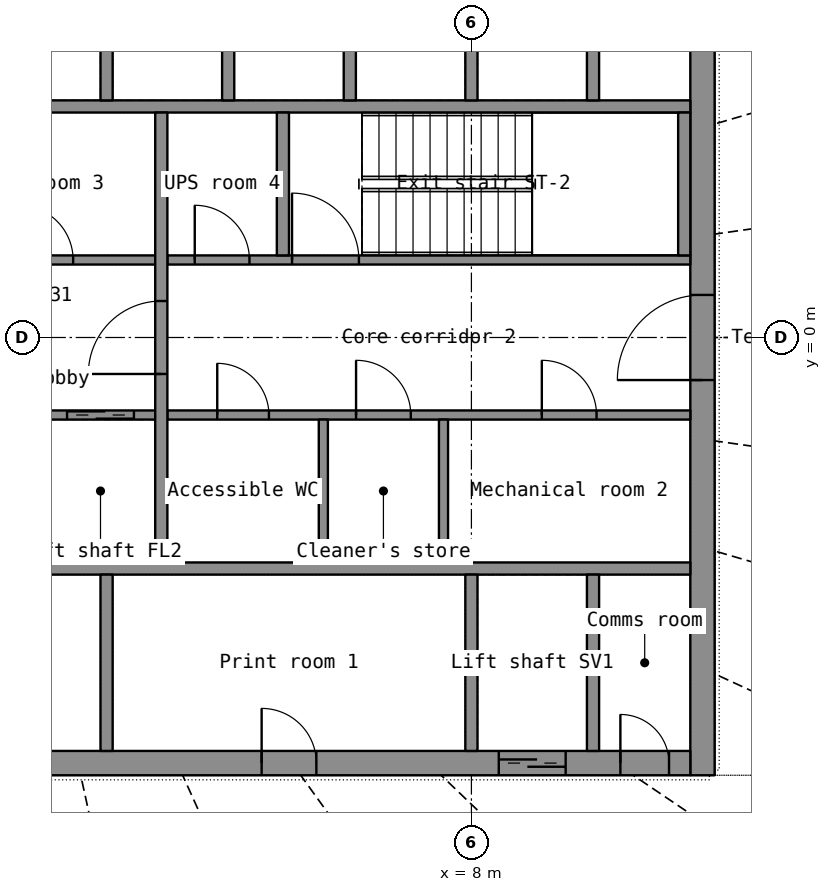
"""IFC4 building model, lengths in metres.
Left out: names, types, materials, properties, quantities, classifications, styles, units other than length and angle.
Written with IfcOpenShell. Run it as: python <this file> out.ifc"""

import sys

from ifc_helpers import new_model, si_unit, direction, frame, frame_2d, origin, place, context, subcontext, project, spatial, rectangle, extrude, element, fill, save


model = new_model("IFC4")
c1 = context("Model", 3, precision=1e-05, world=origin(), true_north=direction((0.0, 1.0)))
c2 = subcontext(c1, "Body", "Model", "MODEL_VIEW")
j1 = project(units=[si_unit("LENGTHUNIT", "METRE"), si_unit("PLANEANGLEUNIT", "RADIAN")], contexts=[c1])
p1 = place(None, origin())
s1 = spatial("IfcSite", under=j1, at=p1, CompositionType="ELEMENT")
p2 = place(p1, origin())
s2 = spatial("IfcBuilding", under=s1, at=p2, CompositionType="ELEMENT")
p3 = place(p2, frame((0.0, 0.0, 239.3)))
s3 = spatial("IfcBuildingStorey", under=s2, at=p3, CompositionType="ELEMENT", Elevation=239.3)
p4 = place(p3, frame((11.8, -7.2, 0.0), z_axis=(0.0, 0.0, 1.0), x_axis=(0.0, 1.0, 0.0)))
e1 = element("IfcWall", 1, at=p4, inside=s3, PredefinedType="SHEAR", context=c2, shape_type="SweptSolid", body=[
    extrude(rectangle(XDim=14.4, YDim=0.4, at=frame_2d((7.2, 0.0))), origin(), (0.0, 0.0, 1.0), 3.3),
])
p5 = place(p4, frame((6.5, 0.0, 0.0)))
e2 = element("IfcOpeningElement", 2, at=p5, cuts=e1, PredefinedType="OPENING", context=c2, shape_type="SweptSolid", body=[
    extrude(rectangle(XDim=1.4, YDim=2.2, at=frame_2d((0.7, 1.1))), frame((0.0, 0.21, 0.0), z_axis=(0.0, -1.0, 0.0), x_axis=(1.0, 0.0, 0.0)), (0.0, 0.0, 1.0), 0.42),
])
p6 = place(p3, frame((-11.6, -7.0, 0.0), z_axis=(0.0, 0.0, 1.0), x_axis=(1.0, 0.0, 0.0)))
e3 = element("IfcWall", 3, at=p6, inside=s3, PredefinedType="SHEAR", context=c2, shape_type="SweptSolid", body=[
    extrude(rectangle(XDim=23.2, YDim=0.4, at=frame_2d((11.6, 0.0))), origin(), (0.0, 0.0, 1.0), 3.3),
])
p7 = place(p6, frame((20.05, 0.0, 0.0)))
e4 = element("IfcOpeningElement", 4, at=p7, cuts=e3, PredefinedType="OPENING", context=c2, shape_type="SweptSolid", body=[
    extrude(rectangle(XDim=1.1, YDim=2.2, at=frame_2d((0.55, 1.1))), frame((0.0, 0.21, 0.0), z_axis=(0.0, -1.0, 0.0), x_axis=(1.0, 0.0, 0.0)), (0.0, 0.0, 1.0), 0.42),
])
p8 = place(p6, frame((5.15, 0.0, 0.0)))
e5 = element("IfcOpeningElement", 5, at=p8, cuts=e3, PredefinedType="OPENING", context=c2, shape_type="SweptSolid", body=[
    extrude(rectangle(XDim=0.9, YDim=2.1, at=frame_2d((0.45, 1.05))), frame((0.0, 0.21, 0.0), z_axis=(0.0, -1.0, 0.0), x_axis=(1.0, 0.0, 0.0)), (0.0, 0.0, 1.0), 0.42),
])
p9 = place(p6, frame((11.15, 0.0, 0.0)))
e6 = element("IfcOpeningElement", 6, at=p9, cuts=e3, PredefinedType="OPENING", context=c2, shape_type="SweptSolid", body=[
    extrude(rectangle(XDim=0.9, YDim=2.1, at=frame_2d((0.45, 1.05))), frame((0.0, 0.21, 0.0), z_axis=(0.0, -1.0, 0.0), x_axis=(1.0, 0.0, 0.0)), (0.0, 0.0, 1.0), 0.42),
])
p10 = place(p6, frame((16.15, 0.0, 0.0)))
e7 = element("IfcOpeningElement", 7, at=p10, cuts=e3, PredefinedType="OPENING", context=c2, shape_type="SweptSolid", body=[
    extrude(rectangle(XDim=0.9, YDim=2.1, at=frame_2d((0.45, 1.05))), frame((0.0, 0.21, 0.0), z_axis=(0.0, -1.0, 0.0), x_axis=(1.0, 0.0, 0.0)), (0.0, 0.0, 1.0), 0.42),
])
p11 = place(p6, frame((0.35, 0.0, 0.0)))
e8 = element("IfcOpeningElement", 8, at=p11, cuts=e3, PredefinedType="OPENING", context=c2, shape_type="SweptSolid", body=[
    extrude(rectangle(XDim=0.8, YDim=2.05, at=frame_2d((0.4, 1.025))), frame((0.0, 0.21, 0.0), z_axis=(0.0, -1.0, 0.0), x_axis=(1.0, 0.0, 0.0)), (0.0, 0.0, 1.0), 0.42),
])
p12 = place(p6, frame((22.05, 0.0, 0.0)))
e9 = element("IfcOpeningElement", 9, at=p12, cuts=e3, PredefinedType="OPENING", context=c2, shape_type="SweptSolid", body=[
    extrude(rectangle(XDim=0.8, YDim=2.05, at=frame_2d((0.4, 1.025))), frame((0.0, 0.21, 0.0), z_axis=(0.0, -1.0, 0.0), x_axis=(1.0, 0.0, 0.0)), (0.0, 0.0, 1.0), 0.42),
])
for number, where, z_axis, x_axis in (
    (10, (-11.6, -3.8, 0.0), (0.0, 0.0, 1.0), (1.0, 0.0, 0.0)),
    (11, (-11.6, 3.8, 0.0), (0.0, 0.0, 1.0), (1.0, 0.0, 0.0)),
):
    element("IfcWall", number, at=place(p3, frame(where, z_axis=z_axis, x_axis=x_axis)), inside=s3, PredefinedType="SHEAR", context=c2, shape_type="SweptSolid", body=[
        extrude(rectangle(XDim=23.2, YDim=0.2, at=frame_2d((11.6, 0.0))), origin(), (0.0, 0.0, 1.0), 3.3),
    ])
for number, where, z_axis, x_axis in (
    (12, (8.0, -6.8, 0.0), (0.0, 0.0, 1.0), (0.0, 1.0, 0.0)),
    (13, (10.0, -6.8, 0.0), (0.0, 0.0, 1.0), (0.0, 1.0, 0.0)),
):
    element("IfcWall", number, at=place(p3, frame(where, z_axis=z_axis, x_axis=x_axis)), inside=s3, PredefinedType="SHEAR", context=c2, shape_type="SweptSolid", body=[
        extrude(rectangle(XDim=2.9, YDim=0.2, at=frame_2d((1.45, 0.0))), origin(), (0.0, 0.0, 1.0), 3.3),
    ])
p13 = place(p3, frame((2.0, -6.8, 0.0), z_axis=(0.0, 0.0, 1.0), x_axis=(0.0, 1.0, 0.0)))
e14 = element("IfcWall", 14, at=p13, inside=s3, PredefinedType="PARTITIONING", context=c2, shape_type="SweptSolid", body=[
    extrude(rectangle(XDim=2.9, YDim=0.2, at=frame_2d((1.45, 0.0))), origin(), (0.0, 0.0, 1.0), 3.3),
])
for number, where, z_axis, x_axis in (
    (15, (2.0, 3.9, 0.0), (0.0, 0.0, 1.0), (0.0, 1.0, 0.0)),
    (16, (4.0, 3.9, 0.0), (0.0, 0.0, 1.0), (0.0, 1.0, 0.0)),
    (17, (6.0, 3.9, 0.0), (0.0, 0.0, 1.0), (0.0, 1.0, 0.0)),
    (18, (8.0, 3.9, 0.0), (0.0, 0.0, 1.0), (0.0, 1.0, 0.0)),
    (19, (10.0, 3.9, 0.0), (0.0, 0.0, 1.0), (0.0, 1.0, 0.0)),
):
    element("IfcWall", number, at=place(p3, frame(where, z_axis=z_axis, x_axis=x_axis)), inside=s3, PredefinedType="SHEAR", context=c2, shape_type="SweptSolid", body=[
        extrude(rectangle(XDim=2.9, YDim=0.2, at=frame_2d((1.45, 0.0))), origin(), (0.0, 0.0, 1.0), 3.3),
    ])
p14 = place(p3, frame((-2.8, -1.275, 0.0), z_axis=(0.0, 0.0, 1.0), x_axis=(1.0, 0.0, 0.0)))
e20 = element("IfcWall", 20, at=p14, inside=s3, PredefinedType="SHEAR", context=c2, shape_type="SweptSolid", body=[
    extrude(rectangle(XDim=5.6, YDim=0.15, at=frame_2d((2.8, 0.0))), origin(), (0.0, 0.0, 1.0), 3.3),
])
p15 = place(p14, frame((4.15, 0.0, 0.0)))
e21 = element("IfcOpeningElement", 21, at=p15, cuts=e20, PredefinedType="OPENING", context=c2, shape_type="SweptSolid", body=[
    extrude(rectangle(XDim=1.1, YDim=2.2, at=frame_2d((0.55, 1.1))), frame((0.0, 0.085, 0.0), z_axis=(0.0, -1.0, 0.0), x_axis=(1.0, 0.0, 0.0)), (0.0, 0.0, 1.0), 0.17),
])
p16 = place(p14, frame((1.35, 0.0, 0.0)))
e22 = element("IfcOpeningElement", 22, at=p16, cuts=e20, PredefinedType="OPENING", context=c2, shape_type="SweptSolid", body=[
    extrude(rectangle(XDim=0.9, YDim=2.1, at=frame_2d((0.45, 1.05))), frame((0.0, 0.085, 0.0), z_axis=(0.0, -1.0, 0.0), x_axis=(1.0, 0.0, 0.0)), (0.0, 0.0, 1.0), 0.17),
])
p17 = place(p3, frame((3.0, -1.275, 0.0), z_axis=(0.0, 0.0, 1.0), x_axis=(1.0, 0.0, 0.0)))
e23 = element("IfcWall", 23, at=p17, inside=s3, PredefinedType="PARTITIONING", context=c2, shape_type="SweptSolid", body=[
    extrude(rectangle(XDim=8.6, YDim=0.15, at=frame_2d((4.3, 0.0))), origin(), (0.0, 0.0, 1.0), 3.3),
])
p18 = place(p17, frame((0.82, 0.0, 0.0)))
e24 = element("IfcOpeningElement", 24, at=p18, cuts=e23, PredefinedType="OPENING", context=c2, shape_type="SweptSolid", body=[
    extrude(rectangle(XDim=0.85, YDim=2.1, at=frame_2d((0.425, 1.05))), frame((0.0, 0.085, 0.0), z_axis=(0.0, -1.0, 0.0), x_axis=(1.0, 0.0, 0.0)), (0.0, 0.0, 1.0), 0.17),
])
p19 = place(p17, frame((3.103, 0.0, 0.0)))
e25 = element("IfcOpeningElement", 25, at=p19, cuts=e23, PredefinedType="OPENING", context=c2, shape_type="SweptSolid", body=[
    extrude(rectangle(XDim=0.9, YDim=2.1, at=frame_2d((0.45, 1.05))), frame((0.0, 0.085, 0.0), z_axis=(0.0, -1.0, 0.0), x_axis=(1.0, 0.0, 0.0)), (0.0, 0.0, 1.0), 0.17),
])
p20 = place(p17, frame((6.158, 0.0, 0.0)))
e26 = element("IfcOpeningElement", 26, at=p20, cuts=e23, PredefinedType="OPENING", context=c2, shape_type="SweptSolid", body=[
    extrude(rectangle(XDim=0.9, YDim=2.1, at=frame_2d((0.45, 1.05))), frame((0.0, 0.085, 0.0), z_axis=(0.0, -1.0, 0.0), x_axis=(1.0, 0.0, 0.0)), (0.0, 0.0, 1.0), 0.17),
])
p21 = place(p3, frame((-2.8, 1.275, 0.0), z_axis=(0.0, 0.0, 1.0), x_axis=(1.0, 0.0, 0.0)))
e27 = element("IfcWall", 27, at=p21, inside=s3, PredefinedType="SHEAR", context=c2, shape_type="SweptSolid", body=[
    extrude(rectangle(XDim=5.6, YDim=0.15, at=frame_2d((2.8, 0.0))), origin(), (0.0, 0.0, 1.0), 3.3),
])
p22 = place(p21, frame((0.35, 0.0, 0.0)))
e28 = element("IfcOpeningElement", 28, at=p22, cuts=e27, PredefinedType="OPENING", context=c2, shape_type="SweptSolid", body=[
    extrude(rectangle(XDim=1.1, YDim=2.2, at=frame_2d((0.55, 1.1))), frame((0.0, 0.085, 0.0), z_axis=(0.0, -1.0, 0.0), x_axis=(1.0, 0.0, 0.0)), (0.0, 0.0, 1.0), 0.17),
])
p23 = place(p21, frame((3.35, 0.0, 0.0)))
e29 = element("IfcOpeningElement", 29, at=p23, cuts=e27, PredefinedType="OPENING", context=c2, shape_type="SweptSolid", body=[
    extrude(rectangle(XDim=0.9, YDim=2.1, at=frame_2d((0.45, 1.05))), frame((0.0, 0.085, 0.0), z_axis=(0.0, -1.0, 0.0), x_axis=(1.0, 0.0, 0.0)), (0.0, 0.0, 1.0), 0.17),
])
p24 = place(p3, frame((3.0, 1.275, 0.0), z_axis=(0.0, 0.0, 1.0), x_axis=(1.0, 0.0, 0.0)))
e30 = element("IfcWall", 30, at=p24, inside=s3, PredefinedType="SHEAR", context=c2, shape_type="SweptSolid", body=[
    extrude(rectangle(XDim=8.6, YDim=0.15, at=frame_2d((4.3, 0.0))), origin(), (0.0, 0.0, 1.0), 3.3),
])
p25 = place(p24, frame((2.05, 0.0, 0.0)))
e31 = element("IfcOpeningElement", 31, at=p25, cuts=e30, PredefinedType="OPENING", context=c2, shape_type="SweptSolid", body=[
    extrude(rectangle(XDim=1.1, YDim=2.15, at=frame_2d((0.55, 1.075))), frame((0.0, 0.085, 0.0), z_axis=(0.0, -1.0, 0.0), x_axis=(1.0, 0.0, 0.0)), (0.0, 0.0, 1.0), 0.17),
])
p26 = place(p24, frame((0.45, 0.0, 0.0)))
e32 = element("IfcOpeningElement", 32, at=p26, cuts=e30, PredefinedType="OPENING", context=c2, shape_type="SweptSolid", body=[
    extrude(rectangle(XDim=0.9, YDim=2.1, at=frame_2d((0.45, 1.05))), frame((0.0, 0.085, 0.0), z_axis=(0.0, -1.0, 0.0), x_axis=(1.0, 0.0, 0.0)), (0.0, 0.0, 1.0), 0.17),
])
p27 = place(p3, frame((2.9, -3.7, 0.0), z_axis=(0.0, 0.0, 1.0), x_axis=(0.0, 1.0, 0.0)))
e33 = element("IfcWall", 33, at=p27, inside=s3, PredefinedType="SHEAR", context=c2, shape_type="SweptSolid", body=[
    extrude(rectangle(XDim=7.4, YDim=0.2, at=frame_2d((3.7, 0.0))), origin(), (0.0, 0.0, 1.0), 3.3),
])
p28 = place(p27, frame((3.1, 0.0, 0.0)))
e34 = element("IfcOpeningElement", 34, at=p28, cuts=e33, PredefinedType="OPENING", context=c2, shape_type="SweptSolid", body=[
    extrude(rectangle(XDim=1.2, YDim=2.2, at=frame_2d((0.6, 1.1))), frame((0.0, 0.11, 0.0), z_axis=(0.0, -1.0, 0.0), x_axis=(1.0, 0.0, 0.0)), (0.0, 0.0, 1.0), 0.22),
])
for number, where, z_axis, x_axis in (
    (35, (11.5, 1.35, 0.0), (0.0, 0.0, 1.0), (0.0, 1.0, 0.0)),
    (36, (4.9, 1.35, 0.0), (0.0, 0.0, 1.0), (0.0, 1.0, 0.0)),
):
    element("IfcWall", number, at=place(p3, frame(where, z_axis=z_axis, x_axis=x_axis)), inside=s3, PredefinedType="SHEAR", context=c2, shape_type="SweptSolid", body=[
        extrude(rectangle(XDim=2.35, YDim=0.2, at=frame_2d((1.175, 0.0))), origin(), (0.0, 0.0, 1.0), 3.3),
    ])
for number, where, z_axis, x_axis in (
    (37, (5.565, -3.7, 0.0), (0.0, 0.0, 1.0), (0.0, 1.0, 0.0)),
    (38, (7.541, -3.7, 0.0), (0.0, 0.0, 1.0), (0.0, 1.0, 0.0)),
):
    element("IfcWall", number, at=place(p3, frame(where, z_axis=z_axis, x_axis=x_axis)), inside=s3, PredefinedType="PARTITIONING", context=c2, shape_type="SweptSolid", body=[
        extrude(rectangle(XDim=2.35, YDim=0.15, at=frame_2d((1.175, 0.0))), origin(), (0.0, 0.0, 1.0), 3.3),
    ])
p29 = place(p7, origin())
e39 = element("IfcDoor", 39, at=p29, inside=s3, OperationType="DOUBLE_DOOR_SLIDING", PredefinedType="DOOR", context=c2, shape_type="SweptSolid", body=[
    extrude(rectangle(XDim=1.1, YDim=2.2, at=frame_2d((0.55, 1.1))), frame((0.0, 0.025, 0.0), z_axis=(0.0, -1.0, 0.0), x_axis=(1.0, 0.0, 0.0)), (0.0, 0.0, 1.0), 0.05),
])
fill(e4, e39)
p30 = place(p10, origin())
e40 = element("IfcDoor", 40, at=p30, inside=s3, OperationType="SINGLE_SWING_LEFT", PredefinedType="DOOR", context=c2, shape_type="SweptSolid", body=[
    extrude(rectangle(XDim=0.9, YDim=2.1, at=frame_2d((0.45, 1.05))), frame((0.0, 0.025, 0.0), z_axis=(0.0, -1.0, 0.0), x_axis=(1.0, 0.0, 0.0)), (0.0, 0.0, 1.0), 0.05),
])
fill(e7, e40)
p31 = place(p12, origin())
e41 = element("IfcDoor", 41, at=p31, inside=s3, OperationType="SINGLE_SWING_LEFT", PredefinedType="DOOR", context=c2, shape_type="SweptSolid", body=[
    extrude(rectangle(XDim=0.8, YDim=2.05, at=frame_2d((0.4, 1.025))), frame((0.0, 0.025, 0.0), z_axis=(0.0, -1.0, 0.0), x_axis=(1.0, 0.0, 0.0)), (0.0, 0.0, 1.0), 0.05),
])
fill(e9, e41)
p32 = place(p5, origin())
e42 = element("IfcDoor", 42, at=p32, inside=s3, OperationType="DOUBLE_DOOR_SINGLE_SWING", PredefinedType="DOOR", context=c2, shape_type="SweptSolid", body=[
    extrude(rectangle(XDim=1.4, YDim=2.2, at=frame_2d((0.7, 1.1))), frame((0.0, 0.025, 0.0), z_axis=(0.0, -1.0, 0.0), x_axis=(1.0, 0.0, 0.0)), (0.0, 0.0, 1.0), 0.05),
])
fill(e2, e42)
p33 = place(p28, origin())
e43 = element("IfcDoor", 43, at=p33, inside=s3, OperationType="SINGLE_SWING_LEFT", PredefinedType="DOOR", context=c2, shape_type="SweptSolid", body=[
    extrude(rectangle(XDim=1.2, YDim=2.2, at=frame_2d((0.6, 1.1))), frame((0.0, 0.025, 0.0), z_axis=(0.0, -1.0, 0.0), x_axis=(1.0, 0.0, 0.0)), (0.0, 0.0, 1.0), 0.05),
])
fill(e34, e43)
p34 = place(p15, origin())
e44 = element("IfcDoor", 44, at=p34, inside=s3, OperationType="DOUBLE_DOOR_SLIDING", PredefinedType="DOOR", context=c2, shape_type="SweptSolid", body=[
    extrude(rectangle(XDim=1.1, YDim=2.2, at=frame_2d((0.55, 1.1))), frame((0.0, 0.025, 0.0), z_axis=(0.0, -1.0, 0.0), x_axis=(1.0, 0.0, 0.0)), (0.0, 0.0, 1.0), 0.05),
])
fill(e21, e44)
p35 = place(p25, origin())
e45 = element("IfcDoor", 45, at=p35, inside=s3, OperationType="SINGLE_SWING_LEFT", PredefinedType="DOOR", context=c2, shape_type="SweptSolid", body=[
    extrude(rectangle(XDim=1.1, YDim=2.15, at=frame_2d((0.55, 1.075))), frame((0.0, 0.025, 0.0), z_axis=(0.0, -1.0, 0.0), x_axis=(1.0, 0.0, 0.0)), (0.0, 0.0, 1.0), 0.05),
])
fill(e31, e45)
p36 = place(p18, origin())
e46 = element("IfcDoor", 46, at=p36, inside=s3, OperationType="SINGLE_SWING_LEFT", PredefinedType="DOOR", context=c2, shape_type="SweptSolid", body=[
    extrude(rectangle(XDim=0.85, YDim=2.1, at=frame_2d((0.425, 1.05))), frame((0.0, 0.025, 0.0), z_axis=(0.0, -1.0, 0.0), x_axis=(1.0, 0.0, 0.0)), (0.0, 0.0, 1.0), 0.05),
])
fill(e24, e46)
p37 = place(p19, origin())
e47 = element("IfcDoor", 47, at=p37, inside=s3, OperationType="SINGLE_SWING_LEFT", PredefinedType="DOOR", context=c2, shape_type="SweptSolid", body=[
    extrude(rectangle(XDim=0.9, YDim=2.1, at=frame_2d((0.45, 1.05))), frame((0.0, 0.025, 0.0), z_axis=(0.0, -1.0, 0.0), x_axis=(1.0, 0.0, 0.0)), (0.0, 0.0, 1.0), 0.05),
])
fill(e25, e47)
p38 = place(p20, origin())
e48 = element("IfcDoor", 48, at=p38, inside=s3, OperationType="SINGLE_SWING_LEFT", PredefinedType="DOOR", context=c2, shape_type="SweptSolid", body=[
    extrude(rectangle(XDim=0.9, YDim=2.1, at=frame_2d((0.45, 1.05))), frame((0.0, 0.025, 0.0), z_axis=(0.0, -1.0, 0.0), x_axis=(1.0, 0.0, 0.0)), (0.0, 0.0, 1.0), 0.05),
])
fill(e26, e48)
p39 = place(p23, origin())
e49 = element("IfcDoor", 49, at=p39, inside=s3, OperationType="SINGLE_SWING_LEFT", PredefinedType="DOOR", context=c2, shape_type="SweptSolid", body=[
    extrude(rectangle(XDim=0.9, YDim=2.1, at=frame_2d((0.45, 1.05))), frame((0.0, 0.025, 0.0), z_axis=(0.0, -1.0, 0.0), x_axis=(1.0, 0.0, 0.0)), (0.0, 0.0, 1.0), 0.05),
])
fill(e29, e49)
p40 = place(p26, origin())
e50 = element("IfcDoor", 50, at=p40, inside=s3, OperationType="SINGLE_SWING_LEFT", PredefinedType="DOOR", context=c2, shape_type="SweptSolid", body=[
    extrude(rectangle(XDim=0.9, YDim=2.1, at=frame_2d((0.45, 1.05))), frame((0.0, 0.025, 0.0), z_axis=(0.0, -1.0, 0.0), x_axis=(1.0, 0.0, 0.0)), (0.0, 0.0, 1.0), 0.05),
])
fill(e32, e50)
save(model, sys.argv[1])
